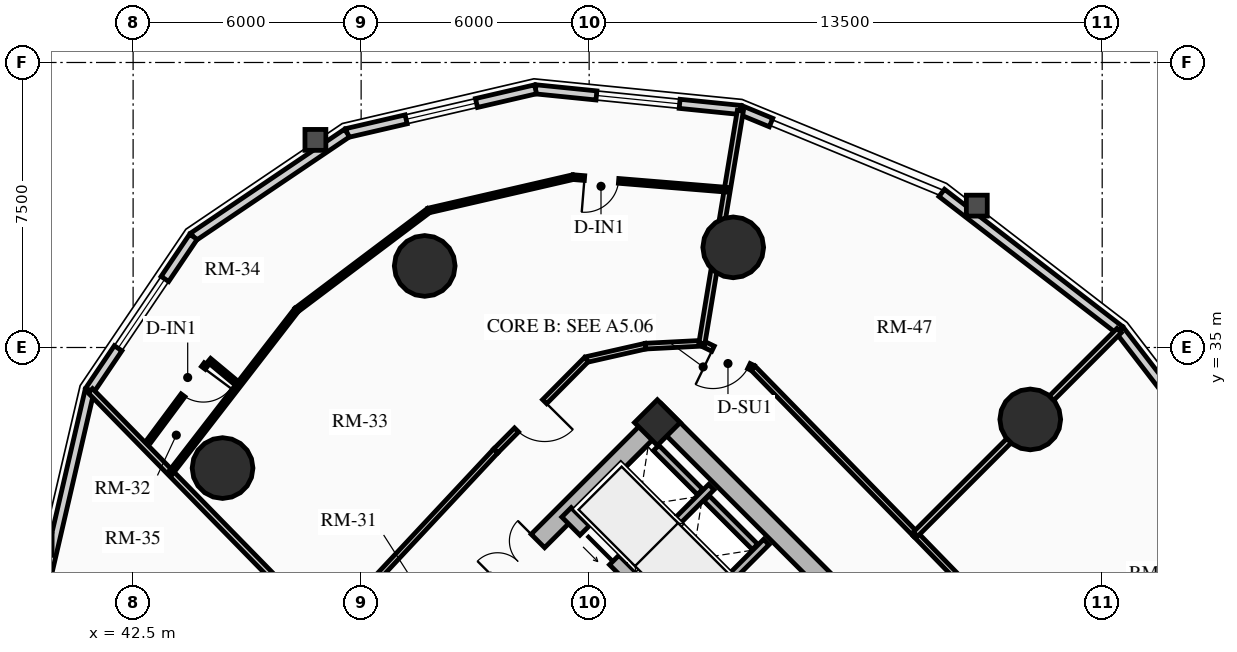
"""IFC4 building model, lengths in metres.
Left out: names, types, materials, properties, quantities, classifications, styles, units other than length and angle.
Written with IfcOpenShell. Run it as: python <this file> out.ifc"""

import sys

from ifc_helpers import new_model, si_unit, direction, frame, frame_2d, origin, origin_2d, place, context, subcontext, project, spatial, rectangle, circle, extrude, source, transform, mapped, element, fill, save


model = new_model("IFC4")
c1 = context("Model", 3, precision=1e-05, world=origin(), true_north=direction((0.0, 1.0)))
c2 = subcontext(c1, "Body", "Model", "MODEL_VIEW")
j1 = project(units=[si_unit("LENGTHUNIT", "METRE"), si_unit("PLANEANGLEUNIT", "RADIAN")], contexts=[c1])
p1 = place(None, origin())
s1 = spatial("IfcSite", under=j1, at=p1, CompositionType="ELEMENT")
p2 = place(p1, origin())
s2 = spatial("IfcBuilding", under=s1, at=p2, CompositionType="ELEMENT")
p3 = place(p2, frame((0.0, 0.0, 45.28)))
s3 = spatial("IfcBuildingStorey", under=s2, at=p3, CompositionType="ELEMENT", Elevation=45.28)
p4 = place(p3, frame((66.339, 23.227, 0.0), z_axis=(0.0, 0.0, 1.0), x_axis=(-0.707106781187, 0.707106781187, 0.0)))
e1 = element("IfcWall", 1, at=p4, inside=s3, PredefinedType="SHEAR", context=c2, shape_type="SweptSolid", body=[
    extrude(rectangle(XDim=14.3, YDim=0.5, at=frame_2d((7.15, 0.0))), origin(), (0.0, 0.0, 1.0), 2.91),
])
p5 = place(p3, frame((48.838, 25.596, 0.0), z_axis=(0.0, 0.0, 1.0), x_axis=(0.707106781187, 0.707106781187, 0.0)))
e2 = element("IfcWall", 2, at=p5, inside=s3, PredefinedType="SHEAR", context=c2, shape_type="SweptSolid", body=[
    extrude(rectangle(XDim=10.7, YDim=0.5, at=frame_2d((5.35, 0.0))), origin(), (0.0, 0.0, 1.0), 2.91),
])
m1 = source(origin(), c2, "Body", "SweptSolid", [
    extrude(rectangle(XDim=1.5, YDim=2.02, at=frame_2d((0.75, 1.01))), frame((0.0, 0.26, 0.0), z_axis=(0.0, -1.0, 0.0), x_axis=(1.0, 0.0, 0.0)), (0.0, 0.0, 1.0), 0.52),
])
p6 = place(p5, frame((4.6, 0.0, 0.0)))
e3 = element("IfcOpeningElement", 3, at=p6, cuts=e2, PredefinedType="OPENING", context=c2, shape_type="MappedRepresentation", body=[
    mapped(m1, transform((0.0, 0.0, 0.0), x_axis=(1.0, 0.0, 0.0), y_axis=(0.0, 1.0, 0.0), z_axis=(0.0, 0.0, 1.0), scale=1.0)),
])
p7 = place(p3, frame((63.662, 20.904, 0.0), z_axis=(0.0, 0.0, 1.0), x_axis=(-0.707106781187, 0.707106781187, 0.0)))
e4 = element("IfcWall", 4, at=p7, inside=s3, PredefinedType="SHEAR", context=c2, shape_type="SweptSolid", body=[
    extrude(rectangle(XDim=13.8, YDim=0.35, at=frame_2d((6.9, 0.0))), origin(), (0.0, 0.0, 1.0), 2.91),
])
m2 = source(origin(), c2, "Body", "SweptSolid", [
    extrude(rectangle(XDim=1.1, YDim=2.015, at=frame_2d((0.55, 1.007))), frame((0.0, 0.185, 0.0), z_axis=(0.0, -1.0, 0.0), x_axis=(1.0, 0.0, 0.0)), (0.0, 0.0, 1.0), 0.37),
])
p8 = place(p7, frame((10.025, 0.0, 0.0)))
e5 = element("IfcOpeningElement", 5, at=p8, cuts=e4, PredefinedType="OPENING", context=c2, shape_type="MappedRepresentation", body=[
    mapped(m2, transform((0.0, 0.0, 0.0), x_axis=(1.0, 0.0, 0.0), y_axis=(0.0, 1.0, 0.0), z_axis=(0.0, 0.0, 1.0), scale=1.0)),
])
p9 = place(p7, frame((12.025, 0.0, 0.0)))
e6 = element("IfcOpeningElement", 6, at=p9, cuts=e4, PredefinedType="OPENING", context=c2, shape_type="MappedRepresentation", body=[
    mapped(m2, transform((0.0, 0.0, 0.0), x_axis=(1.0, 0.0, 0.0), y_axis=(0.0, 1.0, 0.0), z_axis=(0.0, 0.0, 1.0), scale=1.0)),
])
m3 = source(origin(), c2, "Body", "SweptSolid", [
    extrude(rectangle(XDim=1.15, YDim=2.02, at=frame_2d((0.575, 1.01))), frame((0.0, 0.185, 0.0), z_axis=(0.0, -1.0, 0.0), x_axis=(1.0, 0.0, 0.0)), (0.0, 0.0, 1.0), 0.37),
])
p10 = place(p7, frame((5.33, 0.0, 0.0)))
e7 = element("IfcOpeningElement", 7, at=p10, cuts=e4, PredefinedType="OPENING", context=c2, shape_type="MappedRepresentation", body=[
    mapped(m3, transform((0.0, 0.0, 0.0), x_axis=(1.0, 0.0, 0.0), y_axis=(0.0, 1.0, 0.0), z_axis=(0.0, 0.0, 1.0), scale=1.0)),
])
p11 = place(p3, frame((56.294, 33.024, 0.0), z_axis=(0.0, 0.0, 1.0), x_axis=(0.707106781187, 0.707106781187, 0.0)))
e8 = element("IfcColumn", 8, at=p11, inside=s3, PredefinedType="COLUMN", context=c2, shape_type="SweptSolid", body=[
    extrude(rectangle(XDim=0.85, YDim=0.85, at=origin_2d()), origin(), (0.0, 0.0, 1.0), 2.91),
])
for number, where, z_axis, x_axis in (
    (9, (66.107, 33.107, 0.0), (0.0, 0.0, 1.0), (1.0, 0.0, 0.0)),
    (10, (58.291, 37.635, 0.0), (0.0, 0.0, 1.0), (1.0, 0.0, 0.0)),
    (11, (50.173, 37.146, 0.0), (0.0, 0.0, 1.0), (1.0, 0.0, 0.0)),
    (12, (44.854, 31.827, 0.0), (0.0, 0.0, 1.0), (1.0, 0.0, 0.0)),
):
    element("IfcColumn", number, at=place(p3, frame(where, z_axis=z_axis, x_axis=x_axis)), inside=s3, PredefinedType="USERDEFINED", context=c2, shape_type="SweptSolid", body=[
        extrude(circle(Radius=0.8, at=origin_2d()), origin(), (0.0, 0.0, 1.0), 2.91),
    ])
p12 = place(p3, frame((63.778, 39.068, 0.0), z_axis=(0.0, 0.0, 1.0), x_axis=(0.792020182601, -0.610494906082, 0.0)))
e13 = element("IfcWall", 13, at=p12, inside=s3, PredefinedType="SOLIDWALL", context=c2, shape_type="SweptSolid", body=[
    extrude(rectangle(XDim=5.911, YDim=0.24, at=frame_2d((2.956, 0.0))), origin(), (0.0, 0.0, 1.0), 2.073),
])
p13 = place(p3, frame((58.482, 41.251, 0.0), z_axis=(0.0, 0.0, 1.0), x_axis=(0.924556017656, -0.381046152345, 0.0)))
e14 = element("IfcWall", 14, at=p13, inside=s3, PredefinedType="SOLIDWALL", context=c2, shape_type="SweptSolid", body=[
    extrude(rectangle(XDim=0.87, YDim=0.24, at=frame_2d((0.435, 0.0))), origin(), (0.0, 0.0, 1.0), 2.073),
])
p14 = place(p3, frame((53.09, 41.794, 0.0), z_axis=(0.0, 0.0, 1.0), x_axis=(0.994968263437, -0.100190592135, 0.0)))
e15 = element("IfcWall", 15, at=p14, inside=s3, PredefinedType="SOLIDWALL", context=c2, shape_type="SweptSolid", body=[
    extrude(rectangle(XDim=5.419, YDim=0.24, at=frame_2d((2.71, 0.0))), origin(), (0.0, 0.0, 1.0), 2.073),
])
m4 = source(origin(), c2, "Body", "SweptSolid", [
    extrude(rectangle(XDim=2.2, YDim=1.35, at=frame_2d((1.1, 0.675))), frame((0.0, 0.13, 0.0), z_axis=(0.0, -1.0, 0.0), x_axis=(1.0, 0.0, 0.0)), (0.0, 0.0, 1.0), 0.26),
])
p15 = place(p14, frame((1.61, 0.0, 0.65)))
e16 = element("IfcOpeningElement", 16, at=p15, cuts=e15, PredefinedType="OPENING", context=c2, shape_type="MappedRepresentation", body=[
    mapped(m4, transform((0.0, 0.0, 0.0), x_axis=(1.0, 0.0, 0.0), y_axis=(0.0, 1.0, 0.0), z_axis=(0.0, 0.0, 1.0), scale=1.0)),
])
p16 = place(p3, frame((48.129, 40.644, 0.0), z_axis=(0.0, 0.0, 1.0), x_axis=(0.974167686491, 0.22582585901, 0.0)))
e17 = element("IfcWall", 17, at=p16, inside=s3, PredefinedType="SOLIDWALL", context=c2, shape_type="SweptSolid", body=[
    extrude(rectangle(XDim=5.092, YDim=0.24, at=frame_2d((2.546, 0.0))), origin(), (0.0, 0.0, 1.0), 2.073),
])
m5 = source(origin(), c2, "Body", "SweptSolid", [
    extrude(rectangle(XDim=1.9, YDim=1.35, at=frame_2d((0.95, 0.675))), frame((0.0, 0.13, 0.0), z_axis=(0.0, -1.0, 0.0), x_axis=(1.0, 0.0, 0.0)), (0.0, 0.0, 1.0), 0.26),
])
p17 = place(p16, frame((1.596, 0.0, 0.65)))
e18 = element("IfcOpeningElement", 18, at=p17, cuts=e17, PredefinedType="OPENING", context=c2, shape_type="MappedRepresentation", body=[
    mapped(m5, transform((0.0, 0.0, 0.0), x_axis=(1.0, 0.0, 0.0), y_axis=(0.0, 1.0, 0.0), z_axis=(0.0, 0.0, 1.0), scale=1.0)),
])
p18 = place(p3, frame((44.086, 37.914, 0.0), z_axis=(0.0, 0.0, 1.0), x_axis=(0.828748297084, 0.559621532896, 0.0)))
e19 = element("IfcWall", 19, at=p18, inside=s3, PredefinedType="SOLIDWALL", context=c2, shape_type="SweptSolid", body=[
    extrude(rectangle(XDim=4.879, YDim=0.24, at=frame_2d((2.439, 0.0))), origin(), (0.0, 0.0, 1.0), 2.073),
])
p19 = place(p3, frame((41.356, 33.871, 0.0), z_axis=(0.0, 0.0, 1.0), x_axis=(0.559621532896, 0.828748297084, 0.0)))
e20 = element("IfcWall", 20, at=p19, inside=s3, PredefinedType="SOLIDWALL", context=c2, shape_type="SweptSolid", body=[
    extrude(rectangle(XDim=4.879, YDim=0.24, at=frame_2d((2.439, 0.0))), origin(), (0.0, 0.0, 1.0), 2.073),
])
p20 = place(p19, frame((1.339, 0.0, 0.65)))
e21 = element("IfcOpeningElement", 21, at=p20, cuts=e20, PredefinedType="OPENING", context=c2, shape_type="MappedRepresentation", body=[
    mapped(m4, transform((0.0, 0.0, 0.0), x_axis=(1.0, 0.0, 0.0), y_axis=(0.0, 1.0, 0.0), z_axis=(0.0, 0.0, 1.0), scale=1.0)),
])
p21 = place(p3, frame((40.206, 28.91, 0.0), z_axis=(0.0, 0.0, 1.0), x_axis=(0.22582585901, 0.974167686491, 0.0)))
e22 = element("IfcWall", 22, at=p21, inside=s3, PredefinedType="SOLIDWALL", context=c2, shape_type="SweptSolid", body=[
    extrude(rectangle(XDim=5.092, YDim=0.24, at=frame_2d((2.546, 0.0))), origin(), (0.0, 0.0, 1.0), 2.073),
])
p22 = place(p3, frame((68.459, 35.459, 0.0), z_axis=(0.0, 0.0, 1.0), x_axis=(0.610494906082, -0.792020182601, 0.0)))
e23 = element("IfcWall", 23, at=p22, inside=s3, PredefinedType="SOLIDWALL", context=c2, shape_type="SweptSolid", body=[
    extrude(rectangle(XDim=5.911, YDim=0.24, at=frame_2d((2.956, 0.0))), origin(), (0.0, 0.0, 1.0), 2.073),
])
p23 = place(p22, frame((2.005, 0.0, 0.65)))
e24 = element("IfcOpeningElement", 24, at=p23, cuts=e23, PredefinedType="OPENING", context=c2, shape_type="MappedRepresentation", body=[
    mapped(m5, transform((0.0, 0.0, 0.0), x_axis=(1.0, 0.0, 0.0), y_axis=(0.0, 1.0, 0.0), z_axis=(0.0, 0.0, 1.0), scale=1.0)),
])
p24 = place(p3, frame((57.062, 27.781, 0.0), z_axis=(0.0, 0.0, 1.0), x_axis=(0.707106781187, 0.707106781187, 0.0)))
e25 = element("IfcWall", 25, at=p24, inside=s3, PredefinedType="SHEAR", context=c2, shape_type="SweptSolid", body=[
    extrude(rectangle(XDim=2.97, YDim=0.2, at=frame_2d((1.485, 0.0))), origin(), (0.0, 0.0, 1.0), 2.91),
])
p25 = place(p3, frame((55.615, 29.227, 0.0), z_axis=(0.0, 0.0, 1.0), x_axis=(0.707147878904, 0.70706568108, 0.0)))
e26 = element("IfcWall", 26, at=p25, inside=s3, PredefinedType="SHEAR", context=c2, shape_type="SweptSolid", body=[
    extrude(rectangle(XDim=2.97, YDim=0.2, at=frame_2d((1.485, 0.0))), origin(), (0.0, 0.0, 1.0), 2.91),
])
p26 = place(p3, frame((58.865, 29.754, 0.0), z_axis=(0.0, 0.0, 1.0), x_axis=(-0.707174411312, 0.707039144592, 0.0)))
e27 = element("IfcWall", 27, at=p26, inside=s3, PredefinedType="SHEAR", context=c2, shape_type="SweptSolid", body=[
    extrude(rectangle(XDim=1.805, YDim=0.2, at=frame_2d((0.902, 0.0))), origin(), (0.0, 0.0, 1.0), 2.91),
])
p27 = place(p3, frame((57.419, 31.2, 0.0), z_axis=(0.0, 0.0, 1.0), x_axis=(-0.707032117043, 0.707181437447, 0.0)))
e28 = element("IfcWall", 28, at=p27, inside=s3, PredefinedType="SHEAR", context=c2, shape_type="SweptSolid", body=[
    extrude(rectangle(XDim=1.635, YDim=0.2, at=frame_2d((0.817, 0.0))), origin(), (0.0, 0.0, 1.0), 2.91),
])
p28 = place(p3, frame((63.086, 30.086, 0.0), z_axis=(0.0, 0.0, 1.0), x_axis=(-0.699075897379, 0.715047473741, 0.0)))
e29 = element("IfcWall", 29, at=p28, inside=s3, PredefinedType="PARTITIONING", context=c2, shape_type="SweptSolid", body=[
    extrude(rectangle(XDim=6.114, YDim=0.15, at=frame_2d((3.057, 0.0))), origin(), (0.0, 0.0, 1.0), 2.159),
])
p29 = place(p3, frame((58.812, 34.458, 0.0), z_axis=(0.0, 0.0, 1.0), x_axis=(-0.899559490277, 0.436798264021, 0.0)))
e30 = element("IfcWall", 30, at=p29, inside=s3, PredefinedType="PARTITIONING", context=c2, shape_type="SweptSolid", body=[
    extrude(rectangle(XDim=1.495, YDim=0.15, at=frame_2d((0.748, 0.0))), origin(), (0.0, 0.0, 1.0), 2.205),
])
m6 = source(origin(), c2, "Body", "SweptSolid", [
    extrude(rectangle(XDim=1.05, YDim=2.015, at=frame_2d((0.525, 1.007))), frame((0.0, 0.085, 0.0), z_axis=(0.0, -1.0, 0.0), x_axis=(1.0, 0.0, 0.0)), (0.0, 0.0, 1.0), 0.17),
])
p30 = place(p29, frame((0.12, 0.0, 0.0)))
e31 = element("IfcOpeningElement", 31, at=p30, cuts=e30, PredefinedType="OPENING", context=c2, shape_type="MappedRepresentation", body=[
    mapped(m6, transform((0.0, 0.0, 0.0), x_axis=(1.0, 0.0, 0.0), y_axis=(0.0, 1.0, 0.0), z_axis=(0.0, 0.0, 1.0), scale=1.0)),
])
p31 = place(p3, frame((57.467, 35.111, 0.0), z_axis=(0.0, 0.0, 1.0), x_axis=(-0.998691757323, -0.051134859488, 0.0)))
e32 = element("IfcWall", 32, at=p31, inside=s3, PredefinedType="PARTITIONING", context=c2, shape_type="SweptSolid", body=[
    extrude(rectangle(XDim=1.485, YDim=0.15, at=frame_2d((0.742, 0.0))), origin(), (0.0, 0.0, 1.0), 2.159),
])
p32 = place(p3, frame((55.984, 35.035, 0.0), z_axis=(0.0, 0.0, 1.0), x_axis=(-0.975290305708, -0.22092718165, 0.0)))
e33 = element("IfcWall", 33, at=p32, inside=s3, PredefinedType="PARTITIONING", context=c2, shape_type="SweptSolid", body=[
    extrude(rectangle(XDim=1.597, YDim=0.15, at=frame_2d((0.798, 0.0))), origin(), (0.0, 0.0, 1.0), 2.205),
])
p33 = place(p3, frame((54.427, 34.683, 0.0), z_axis=(0.0, 0.0, 1.0), x_axis=(-0.704178989986, -0.710022499687, 0.0)))
e34 = element("IfcWall", 34, at=p33, inside=s3, PredefinedType="PARTITIONING", context=c2, shape_type="SweptSolid", body=[
    extrude(rectangle(XDim=3.384, YDim=0.15, at=frame_2d((1.692, 0.0))), origin(), (0.0, 0.0, 1.0), 2.159),
])
p34 = place(p33, frame((1.56, 0.0, 0.0)))
e35 = element("IfcOpeningElement", 35, at=p34, cuts=e34, PredefinedType="OPENING", context=c2, shape_type="MappedRepresentation", body=[
    mapped(m6, transform((0.0, 0.0, 0.0), x_axis=(1.0, 0.0, 0.0), y_axis=(0.0, 1.0, 0.0), z_axis=(0.0, 0.0, 1.0), scale=1.0)),
])
p35 = place(p3, frame((52.043, 32.28, 0.0), z_axis=(0.0, 0.0, 1.0), x_axis=(-0.682606081633, -0.730786519661, 0.0)))
e36 = element("IfcWall", 36, at=p35, inside=s3, PredefinedType="PARTITIONING", context=c2, shape_type="SweptSolid", body=[
    extrude(rectangle(XDim=6.527, YDim=0.15, at=frame_2d((3.263, 0.0))), origin(), (0.0, 0.0, 1.0), 2.159),
])
p36 = place(p3, frame((67.27, 25.78, 0.0), z_axis=(0.0, 0.0, 1.0), x_axis=(-0.696847842907, 0.717218992942, 0.0)))
e37 = element("IfcWall", 37, at=p36, inside=s3, PredefinedType="PARTITIONING", context=c2, shape_type="SweptSolid", body=[
    extrude(rectangle(XDim=6.004, YDim=0.15, at=frame_2d((3.002, 0.0))), origin(), (0.0, 0.0, 1.0), 2.635),
])
m7 = source(origin(), c2, "Body", "SweptSolid", [
    extrude(rectangle(XDim=1.0, YDim=2.015, at=frame_2d((0.5, 1.007))), frame((0.0, 0.085, 0.0), z_axis=(0.0, -1.0, 0.0), x_axis=(1.0, 0.0, 0.0)), (0.0, 0.0, 1.0), 0.17),
])
p37 = place(p36, frame((2.502, 0.0, 0.0)))
e38 = element("IfcOpeningElement", 38, at=p37, cuts=e37, PredefinedType="OPENING", context=c2, shape_type="MappedRepresentation", body=[
    mapped(m7, transform((0.0, 0.0, 0.0), x_axis=(1.0, 0.0, 0.0), y_axis=(0.0, 1.0, 0.0), z_axis=(0.0, 0.0, 1.0), scale=1.0)),
])
p38 = place(p3, frame((63.086, 30.086, 0.0), z_axis=(0.0, 0.0, 1.0), x_axis=(0.707106781187, 0.707106781187, 0.0)))
e39 = element("IfcWall", 39, at=p38, inside=s3, PredefinedType="PARTITIONING", context=c2, shape_type="SweptSolid", body=[
    extrude(rectangle(XDim=7.579, YDim=0.16, at=frame_2d((3.79, 0.0))), origin(), (0.0, 0.0, 1.0), 2.073),
])
p39 = place(p3, frame((57.467, 35.111, 0.0), z_axis=(0.0, 0.0, 1.0), x_axis=(0.163141505202, 0.986602680556, 0.0)))
e40 = element("IfcWall", 40, at=p39, inside=s3, PredefinedType="PARTITIONING", context=c2, shape_type="SweptSolid", body=[
    extrude(rectangle(XDim=6.203, YDim=0.16, at=frame_2d((3.102, 0.0))), origin(), (0.0, 0.0, 1.0), 2.073),
])
p40 = place(p3, frame((47.588, 27.51, 0.0), z_axis=(0.0, 0.0, 1.0), x_axis=(-0.699371977892, 0.714757886657, 0.0)))
e41 = element("IfcWall", 41, at=p40, inside=s3, PredefinedType="PARTITIONING", context=c2, shape_type="SweptSolid", body=[
    extrude(rectangle(XDim=8.886, YDim=0.16, at=frame_2d((4.443, 0.0))), origin(), (0.0, 0.0, 1.0), 2.073),
])
p41 = place(p3, frame((58.135, 39.15, 0.0), z_axis=(0.0, 0.0, 1.0), x_axis=(-0.996661360768, 0.081646383578, 0.0)))
e42 = element("IfcWall", 42, at=p41, inside=s3, PredefinedType="PARTITIONING", context=c2, shape_type="SweptSolid", body=[
    extrude(rectangle(XDim=4.073, YDim=0.125, at=frame_2d((2.036, 0.0))), origin(), (0.0, 0.0, 1.0), 2.205),
])
m8 = source(origin(), c2, "Body", "SweptSolid", [
    extrude(rectangle(XDim=0.9, YDim=2.005, at=frame_2d((0.45, 1.002))), frame((0.0, 0.073, 0.0), z_axis=(0.0, -1.0, 0.0), x_axis=(1.0, 0.0, 0.0)), (0.0, 0.0, 1.0), 0.145),
])
p42 = place(p41, frame((2.869, 0.0, 0.0)))
e43 = element("IfcOpeningElement", 43, at=p42, cuts=e42, PredefinedType="OPENING", context=c2, shape_type="MappedRepresentation", body=[
    mapped(m8, transform((0.0, 0.0, 0.0), x_axis=(1.0, 0.0, 0.0), y_axis=(0.0, 1.0, 0.0), z_axis=(0.0, 0.0, 1.0), scale=1.0)),
])
p43 = place(p3, frame((54.076, 39.483, 0.0), z_axis=(0.0, 0.0, 1.0), x_axis=(-0.974339463782, -0.225083560744, 0.0)))
e44 = element("IfcWall", 44, at=p43, inside=s3, PredefinedType="PARTITIONING", context=c2, shape_type="SweptSolid", body=[
    extrude(rectangle(XDim=3.899, YDim=0.125, at=frame_2d((1.95, 0.0))), origin(), (0.0, 0.0, 1.0), 2.205),
])
p44 = place(p3, frame((50.276, 38.605, 0.0), z_axis=(0.0, 0.0, 1.0), x_axis=(-0.798927876279, -0.60142684385, 0.0)))
e45 = element("IfcWall", 45, at=p44, inside=s3, PredefinedType="PARTITIONING", context=c2, shape_type="SweptSolid", body=[
    extrude(rectangle(XDim=4.35, YDim=0.125, at=frame_2d((2.175, 0.0))), origin(), (0.0, 0.0, 1.0), 2.159),
])
p45 = place(p3, frame((46.801, 35.989, 0.0), z_axis=(0.0, 0.0, 1.0), x_axis=(-0.611635984749, -0.791139319058, 0.0)))
e46 = element("IfcWall", 46, at=p45, inside=s3, PredefinedType="PARTITIONING", context=c2, shape_type="SweptSolid", body=[
    extrude(rectangle(XDim=5.419, YDim=0.125, at=frame_2d((2.709, 0.0))), origin(), (0.0, 0.0, 1.0), 2.159),
])
p46 = place(p3, frame((45.204, 34.078, 0.0), z_axis=(0.0, 0.0, 1.0), x_axis=(-0.768330339969, 0.640053504547, 0.0)))
e47 = element("IfcWall", 47, at=p46, inside=s3, PredefinedType="PARTITIONING", context=c2, shape_type="SweptSolid", body=[
    extrude(rectangle(XDim=0.917, YDim=0.125, at=frame_2d((0.458, 0.0))), origin(), (0.0, 0.0, 1.0), 2.635),
])
p47 = place(p3, frame((44.421, 34.56, 0.0), z_axis=(0.0, 0.0, 1.0), x_axis=(-0.596454407051, -0.802646958699, 0.0)))
e48 = element("IfcWall", 48, at=p47, inside=s3, PredefinedType="PARTITIONING", context=c2, shape_type="SweptSolid", body=[
    extrude(rectangle(XDim=2.516, YDim=0.125, at=frame_2d((1.258, 0.0))), origin(), (0.0, 0.0, 1.0), 2.159),
])
p48 = place(p47, frame((0.12, 0.0, 0.0)))
e49 = element("IfcOpeningElement", 49, at=p48, cuts=e48, PredefinedType="OPENING", context=c2, shape_type="MappedRepresentation", body=[
    mapped(m8, transform((0.0, 0.0, 0.0), x_axis=(1.0, 0.0, 0.0), y_axis=(0.0, 1.0, 0.0), z_axis=(0.0, 0.0, 1.0), scale=1.0)),
])
m9 = source(origin(), c2, "Body", "SweptSolid", [
    extrude(rectangle(XDim=2.2, YDim=1.35, at=frame_2d((1.1, 0.675))), frame((0.0, 0.03, 0.0), z_axis=(0.0, -1.0, 0.0), x_axis=(1.0, 0.0, 0.0)), (0.0, 0.0, 1.0), 0.06),
])
p49 = place(p15, origin())
e50 = element("IfcWindow", 50, at=p49, inside=s3, PartitioningType="DOUBLE_PANEL_VERTICAL", PredefinedType="WINDOW", context=c2, shape_type="MappedRepresentation", body=[
    mapped(m9, transform((0.0, 0.0, 0.0), x_axis=(1.0, 0.0, 0.0), y_axis=(0.0, 1.0, 0.0), z_axis=(0.0, 0.0, 1.0), scale=1.0)),
])
fill(e16, e50)
m10 = source(origin(), c2, "Body", "SweptSolid", [
    extrude(rectangle(XDim=1.9, YDim=1.35, at=frame_2d((0.95, 0.675))), frame((0.0, 0.03, 0.0), z_axis=(0.0, -1.0, 0.0), x_axis=(1.0, 0.0, 0.0)), (0.0, 0.0, 1.0), 0.06),
])
p50 = place(p17, origin())
e51 = element("IfcWindow", 51, at=p50, inside=s3, PartitioningType="DOUBLE_PANEL_VERTICAL", PredefinedType="WINDOW", context=c2, shape_type="MappedRepresentation", body=[
    mapped(m10, transform((0.0, 0.0, 0.0), x_axis=(1.0, 0.0, 0.0), y_axis=(0.0, 1.0, 0.0), z_axis=(0.0, 0.0, 1.0), scale=1.0)),
])
fill(e18, e51)
p51 = place(p20, origin())
e52 = element("IfcWindow", 52, at=p51, inside=s3, PartitioningType="DOUBLE_PANEL_VERTICAL", PredefinedType="WINDOW", context=c2, shape_type="MappedRepresentation", body=[
    mapped(m9, transform((0.0, 0.0, 0.0), x_axis=(1.0, 0.0, 0.0), y_axis=(0.0, 1.0, 0.0), z_axis=(0.0, 0.0, 1.0), scale=1.0)),
])
fill(e21, e52)
m11 = source(origin(), c2, "Body", "SweptSolid", [
    extrude(rectangle(XDim=1.1, YDim=2.015, at=frame_2d((0.55, 1.007))), frame((0.0, 0.025, 0.0), z_axis=(0.0, -1.0, 0.0), x_axis=(1.0, 0.0, 0.0)), (0.0, 0.0, 1.0), 0.05),
])
p52 = place(p9, origin())
e53 = element("IfcDoor", 53, at=p52, inside=s3, OperationType="SLIDING_TO_LEFT", PredefinedType="DOOR", context=c2, shape_type="MappedRepresentation", body=[
    mapped(m11, transform((0.0, 0.0, 0.0), x_axis=(1.0, 0.0, 0.0), y_axis=(0.0, 1.0, 0.0), z_axis=(0.0, 0.0, 1.0), scale=1.0)),
])
fill(e6, e53)
m12 = source(origin(), c2, "Body", "SweptSolid", [
    extrude(rectangle(XDim=1.5, YDim=2.02, at=frame_2d((0.75, 1.01))), frame((0.0, 0.025, 0.0), z_axis=(0.0, -1.0, 0.0), x_axis=(1.0, 0.0, 0.0)), (0.0, 0.0, 1.0), 0.05),
])
p53 = place(p6, origin())
e54 = element("IfcDoor", 54, at=p53, inside=s3, OperationType="DOUBLE_DOOR_SINGLE_SWING", PredefinedType="DOOR", context=c2, shape_type="MappedRepresentation", body=[
    mapped(m12, transform((0.0, 0.0, 0.0), x_axis=(1.0, 0.0, 0.0), y_axis=(0.0, 1.0, 0.0), z_axis=(0.0, 0.0, 1.0), scale=1.0)),
])
fill(e3, e54)
m13 = source(origin(), c2, "Body", "SweptSolid", [
    extrude(rectangle(XDim=1.05, YDim=2.015, at=frame_2d((0.525, 1.007))), frame((0.0, 0.025, 0.0), z_axis=(0.0, -1.0, 0.0), x_axis=(1.0, 0.0, 0.0)), (0.0, 0.0, 1.0), 0.05),
])
p54 = place(p34, origin())
e55 = element("IfcDoor", 55, at=p54, inside=s3, OperationType="SINGLE_SWING_LEFT", PredefinedType="DOOR", context=c2, shape_type="MappedRepresentation", body=[
    mapped(m13, transform((0.0, 0.0, 0.0), x_axis=(1.0, 0.0, 0.0), y_axis=(0.0, 1.0, 0.0), z_axis=(0.0, 0.0, 1.0), scale=1.0)),
])
fill(e35, e55)
m14 = source(origin(), c2, "Body", "SweptSolid", [
    extrude(rectangle(XDim=0.9, YDim=2.005, at=frame_2d((0.45, 1.002))), frame((0.0, 0.025, 0.0), z_axis=(0.0, -1.0, 0.0), x_axis=(1.0, 0.0, 0.0)), (0.0, 0.0, 1.0), 0.05),
])
p55 = place(p42, origin())
e56 = element("IfcDoor", 56, at=p55, inside=s3, OperationType="SINGLE_SWING_RIGHT", PredefinedType="DOOR", context=c2, shape_type="MappedRepresentation", body=[
    mapped(m14, transform((0.0, 0.0, 0.0), x_axis=(1.0, 0.0, 0.0), y_axis=(0.0, 1.0, 0.0), z_axis=(0.0, 0.0, 1.0), scale=1.0)),
])
fill(e43, e56)
p56 = place(p48, origin())
e57 = element("IfcDoor", 57, at=p56, inside=s3, OperationType="SINGLE_SWING_LEFT", PredefinedType="DOOR", context=c2, shape_type="MappedRepresentation", body=[
    mapped(m14, transform((0.0, 0.0, 0.0), x_axis=(1.0, 0.0, 0.0), y_axis=(0.0, 1.0, 0.0), z_axis=(0.0, 0.0, 1.0), scale=1.0)),
])
fill(e49, e57)
p57 = place(p30, origin())
e58 = element("IfcDoor", 58, at=p57, inside=s3, OperationType="SINGLE_SWING_RIGHT", PredefinedType="DOOR", context=c2, shape_type="MappedRepresentation", body=[
    mapped(m13, transform((0.0, 0.0, 0.0), x_axis=(1.0, 0.0, 0.0), y_axis=(0.0, 1.0, 0.0), z_axis=(0.0, 0.0, 1.0), scale=1.0)),
])
fill(e31, e58)
save(model, sys.argv[1])
